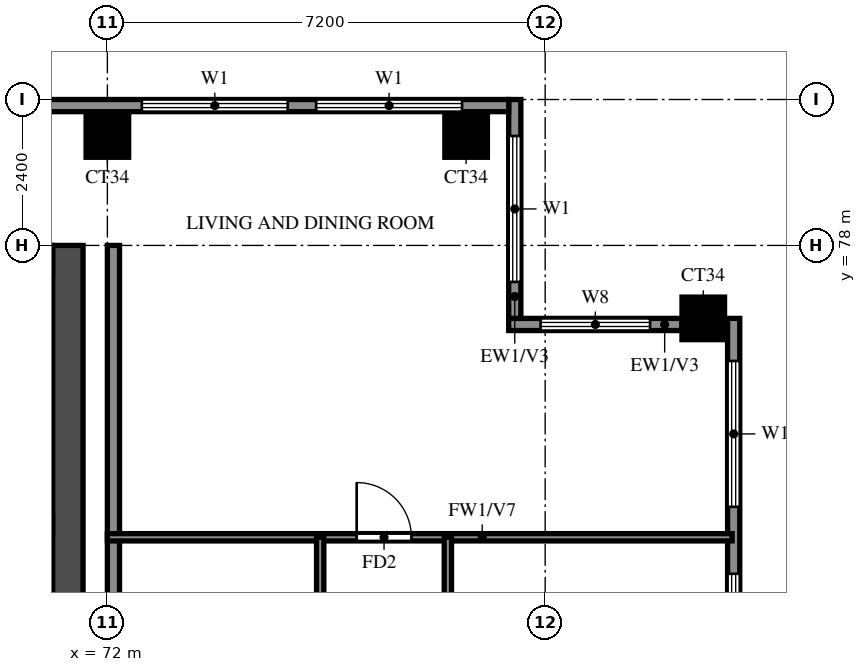
"""IFC4 building model, lengths in metres.
Left out: names, types, materials, properties, quantities, classifications, styles, units other than length and angle.
Written with IfcOpenShell. Run it as: python <this file> out.ifc"""

import sys

from ifc_helpers import new_model, si_unit, direction, frame, frame_2d, origin, origin_2d, place, context, subcontext, project, spatial, rectangle, extrude, source, transform, mapped, element, fill, save


model = new_model("IFC4")
c1 = context("Model", 3, precision=1e-05, world=origin(), true_north=direction((0.0, 1.0)))
c2 = subcontext(c1, "Body", "Model", "MODEL_VIEW")
j1 = project(units=[si_unit("LENGTHUNIT", "METRE"), si_unit("PLANEANGLEUNIT", "RADIAN")], contexts=[c1])
p1 = place(None, origin())
s1 = spatial("IfcSite", under=j1, at=p1, CompositionType="ELEMENT")
p2 = place(p1, origin())
s2 = spatial("IfcBuilding", under=s1, at=p2, CompositionType="ELEMENT")
p3 = place(p2, frame((0.0, 0.0, 225.5)))
s3 = spatial("IfcBuildingStorey", under=s2, at=p3, CompositionType="ELEMENT", Elevation=225.5)
m1 = source(origin(), c2, "Body", "SweptSolid", [
    extrude(rectangle(XDim=0.7, YDim=0.7, at=origin_2d()), origin(), (0.0, 0.0, 1.0), 3.22),
])
for number, where, z_axis, x_axis in (
    (1, (81.8, 76.8, 0.0), (0.0, 0.0, 1.0), (1.0, 0.0, 0.0)),
    (2, (72.0, 79.8, 0.0), (0.0, 0.0, 1.0), (1.0, 0.0, 0.0)),
    (3, (77.9, 79.8, 0.0), (0.0, 0.0, 1.0), (1.0, 0.0, 0.0)),
):
    element("IfcColumn", number, at=place(p3, frame(where, z_axis=z_axis, x_axis=x_axis)), inside=s3, PredefinedType="COLUMN", context=c2, shape_type="MappedRepresentation", body=[
        mapped(m1, transform((0.0, 0.0, 0.0))),
    ])
p4 = place(p3, frame((71.35, 66.15, 0.0), z_axis=(0.0, 0.0, 1.0), x_axis=(0.0, 1.0, 0.0)))
e4 = element("IfcWall", 4, at=p4, inside=s3, PredefinedType="SHEAR", context=c2, shape_type="SweptSolid", body=[
    extrude(rectangle(XDim=11.85, YDim=0.5, at=frame_2d((5.925, 0.0))), origin(), (0.0, 0.0, 1.0), 3.22),
])
p5 = place(p3, frame((29.7, 77.75, 0.0), z_axis=(0.0, 0.0, 1.0), x_axis=(1.0, 0.0, 0.0)))
e5 = element("IfcWall", 5, at=p5, inside=s3, PredefinedType="SHEAR", context=c2, shape_type="SweptSolid", body=[
    extrude(rectangle(XDim=41.4, YDim=0.5, at=frame_2d((20.7, 0.0))), origin(), (0.0, 0.0, 1.0), 3.22),
])
p6 = place(p3, frame((82.3, 48.2, 0.0), z_axis=(0.0, 0.0, 1.0), x_axis=(0.0, 1.0, 0.0)))
e6 = element("IfcWall", 6, at=p6, inside=s3, PredefinedType="SOLIDWALL", context=c2, shape_type="SweptSolid", body=[
    extrude(rectangle(XDim=28.6, YDim=0.2, at=frame_2d((14.3, 0.0))), origin(), (0.0, 0.0, 1.0), 3.22),
])
p7 = place(p6, frame((15.1, 0.0, 0.0)))
e7 = element("IfcOpeningElement", 7, at=p7, cuts=e6, PredefinedType="OPENING", context=c2, shape_type="SweptSolid", body=[
    extrude(rectangle(XDim=1.8, YDim=2.4, at=frame_2d((0.9, 1.2))), frame((0.0, 0.11, 0.0), z_axis=(0.0, -1.0, 0.0), x_axis=(1.0, 0.0, 0.0)), (0.0, 0.0, 1.0), 0.22),
])
p8 = place(p6, frame((0.6, 0.0, 0.6)))
e8 = element("IfcOpeningElement", 8, at=p8, cuts=e6, PredefinedType="OPENING", context=c2, shape_type="SweptSolid", body=[
    extrude(rectangle(XDim=2.4, YDim=2.4, at=frame_2d((1.2, 1.2))), frame((0.0, 0.11, 0.0), z_axis=(0.0, -1.0, 0.0), x_axis=(1.0, 0.0, 0.0)), (0.0, 0.0, 1.0), 0.22),
])
p9 = place(p6, frame((4.75, 0.0, 1.5)))
e9 = element("IfcOpeningElement", 9, at=p9, cuts=e6, PredefinedType="OPENING", context=c2, shape_type="SweptSolid", body=[
    extrude(rectangle(XDim=0.9, YDim=0.9, at=frame_2d((0.45, 0.45))), frame((0.0, 0.11, 0.0), z_axis=(0.0, -1.0, 0.0), x_axis=(1.0, 0.0, 0.0)), (0.0, 0.0, 1.0), 0.22),
])
p10 = place(p6, frame((8.2, 0.0, 0.6)))
e10 = element("IfcOpeningElement", 10, at=p10, cuts=e6, PredefinedType="OPENING", context=c2, shape_type="SweptSolid", body=[
    extrude(rectangle(XDim=2.4, YDim=2.4, at=frame_2d((1.2, 1.2))), frame((0.0, 0.11, 0.0), z_axis=(0.0, -1.0, 0.0), x_axis=(1.0, 0.0, 0.0)), (0.0, 0.0, 1.0), 0.22),
])
p11 = place(p6, frame((12.7, 0.0, 0.6)))
e11 = element("IfcOpeningElement", 11, at=p11, cuts=e6, PredefinedType="OPENING", context=c2, shape_type="SweptSolid", body=[
    extrude(rectangle(XDim=1.2, YDim=2.4, at=frame_2d((0.6, 1.2))), frame((0.0, 0.11, 0.0), z_axis=(0.0, -1.0, 0.0), x_axis=(1.0, 0.0, 0.0)), (0.0, 0.0, 1.0), 0.22),
])
p12 = place(p6, frame((19.3, 0.0, 0.6)))
e12 = element("IfcOpeningElement", 12, at=p12, cuts=e6, PredefinedType="OPENING", context=c2, shape_type="SweptSolid", body=[
    extrude(rectangle(XDim=1.8, YDim=2.4, at=frame_2d((0.9, 1.2))), frame((0.0, 0.11, 0.0), z_axis=(0.0, -1.0, 0.0), x_axis=(1.0, 0.0, 0.0)), (0.0, 0.0, 1.0), 0.22),
])
p13 = place(p6, frame((22.0, 0.0, 0.6)))
e13 = element("IfcOpeningElement", 13, at=p13, cuts=e6, PredefinedType="OPENING", context=c2, shape_type="SweptSolid", body=[
    extrude(rectangle(XDim=2.4, YDim=2.4, at=frame_2d((1.2, 1.2))), frame((0.0, 0.11, 0.0), z_axis=(0.0, -1.0, 0.0), x_axis=(1.0, 0.0, 0.0)), (0.0, 0.0, 1.0), 0.22),
])
p14 = place(p6, frame((25.5, 0.0, 0.6)))
e14 = element("IfcOpeningElement", 14, at=p14, cuts=e6, PredefinedType="OPENING", context=c2, shape_type="SweptSolid", body=[
    extrude(rectangle(XDim=2.4, YDim=2.4, at=frame_2d((1.2, 1.2))), frame((0.0, 0.11, 0.0), z_axis=(0.0, -1.0, 0.0), x_axis=(1.0, 0.0, 0.0)), (0.0, 0.0, 1.0), 0.22),
])
p15 = place(p3, frame((81.45, 76.7, 0.0), z_axis=(0.0, 0.0, 1.0), x_axis=(-1.0, 0.0, 0.0)))
e15 = element("IfcWall", 15, at=p15, inside=s3, PredefinedType="SOLIDWALL", context=c2, shape_type="SweptSolid", body=[
    extrude(rectangle(XDim=2.85, YDim=0.2, at=frame_2d((1.425, 0.0))), origin(), (0.0, 0.0, 1.0), 3.22),
])
p16 = place(p15, frame((0.525, 0.0, 0.6)))
e16 = element("IfcOpeningElement", 16, at=p16, cuts=e15, PredefinedType="OPENING", context=c2, shape_type="SweptSolid", body=[
    extrude(rectangle(XDim=1.8, YDim=2.4, at=frame_2d((0.9, 1.2))), frame((0.0, 0.11, 0.0), z_axis=(0.0, -1.0, 0.0), x_axis=(1.0, 0.0, 0.0)), (0.0, 0.0, 1.0), 0.22),
])
p17 = place(p3, frame((78.7, 76.8, 0.0), z_axis=(0.0, 0.0, 1.0), x_axis=(0.0, 1.0, 0.0)))
e17 = element("IfcWall", 17, at=p17, inside=s3, PredefinedType="SOLIDWALL", context=c2, shape_type="SweptSolid", body=[
    extrude(rectangle(XDim=3.6, YDim=0.2, at=frame_2d((1.8, 0.0))), origin(), (0.0, 0.0, 1.0), 3.22),
])
p18 = place(p17, frame((0.6, 0.0, 0.6)))
e18 = element("IfcOpeningElement", 18, at=p18, cuts=e17, PredefinedType="OPENING", context=c2, shape_type="SweptSolid", body=[
    extrude(rectangle(XDim=2.4, YDim=2.4, at=frame_2d((1.2, 1.2))), frame((0.0, 0.11, 0.0), z_axis=(0.0, -1.0, 0.0), x_axis=(1.0, 0.0, 0.0)), (0.0, 0.0, 1.0), 0.22),
])
p19 = place(p3, frame((78.6, 80.3, 0.0), z_axis=(0.0, 0.0, 1.0), x_axis=(-1.0, 0.0, 0.0)))
e19 = element("IfcWall", 19, at=p19, inside=s3, PredefinedType="SOLIDWALL", context=c2, shape_type="SweptSolid", body=[
    extrude(rectangle(XDim=56.6, YDim=0.2, at=frame_2d((28.3, 0.0))), origin(), (0.0, 0.0, 1.0), 3.22),
])
p20 = place(p19, frame((50.433, 0.0, 0.6)))
e20 = element("IfcOpeningElement", 20, at=p20, cuts=e19, PredefinedType="OPENING", context=c2, shape_type="SweptSolid", body=[
    extrude(rectangle(XDim=2.4, YDim=2.4, at=frame_2d((1.2, 1.2))), frame((0.0, 0.11, 0.0), z_axis=(0.0, -1.0, 0.0), x_axis=(1.0, 0.0, 0.0)), (0.0, 0.0, 1.0), 0.22),
])
p21 = place(p19, frame((53.367, 0.0, 0.6)))
e21 = element("IfcOpeningElement", 21, at=p21, cuts=e19, PredefinedType="OPENING", context=c2, shape_type="SweptSolid", body=[
    extrude(rectangle(XDim=2.4, YDim=2.4, at=frame_2d((1.2, 1.2))), frame((0.0, 0.11, 0.0), z_axis=(0.0, -1.0, 0.0), x_axis=(1.0, 0.0, 0.0)), (0.0, 0.0, 1.0), 0.22),
])
p22 = place(p19, frame((0.767, 0.0, 0.6)))
e22 = element("IfcOpeningElement", 22, at=p22, cuts=e19, PredefinedType="OPENING", context=c2, shape_type="SweptSolid", body=[
    extrude(rectangle(XDim=2.4, YDim=2.4, at=frame_2d((1.2, 1.2))), frame((0.0, 0.11, 0.0), z_axis=(0.0, -1.0, 0.0), x_axis=(1.0, 0.0, 0.0)), (0.0, 0.0, 1.0), 0.22),
])
p23 = place(p19, frame((3.633, 0.0, 0.6)))
e23 = element("IfcOpeningElement", 23, at=p23, cuts=e19, PredefinedType="OPENING", context=c2, shape_type="SweptSolid", body=[
    extrude(rectangle(XDim=2.4, YDim=2.4, at=frame_2d((1.2, 1.2))), frame((0.0, 0.11, 0.0), z_axis=(0.0, -1.0, 0.0), x_axis=(1.0, 0.0, 0.0)), (0.0, 0.0, 1.0), 0.22),
])
p24 = place(p3, frame((72.1, 62.4, 0.0), z_axis=(0.0, 0.0, 1.0), x_axis=(0.0, 1.0, 0.0)))
e24 = element("IfcWall", 24, at=p24, inside=s3, PredefinedType="SOLIDWALL", context=c2, shape_type="SweptSolid", body=[
    extrude(rectangle(XDim=15.6, YDim=0.2, at=frame_2d((7.8, 0.0))), origin(), (0.0, 0.0, 1.0), 3.22),
])
p25 = place(p3, frame((72.0, 73.2, 0.0), z_axis=(0.0, 0.0, 1.0), x_axis=(1.0, 0.0, 0.0)))
e25 = element("IfcWall", 25, at=p25, inside=s3, PredefinedType="PARTITIONING", context=c2, shape_type="SweptSolid", body=[
    extrude(rectangle(XDim=10.275, YDim=0.12, at=frame_2d((5.137, 0.0))), origin(), (0.0, 0.0, 1.0), 2.32),
])
p26 = place(p25, frame((4.1, 0.0, 0.0)))
e26 = element("IfcOpeningElement", 26, at=p26, cuts=e25, PredefinedType="OPENING", context=c2, shape_type="SweptSolid", body=[
    extrude(rectangle(XDim=0.9, YDim=2.1, at=frame_2d((0.45, 1.05))), frame((0.0, 0.07, 0.0), z_axis=(0.0, -1.0, 0.0), x_axis=(1.0, 0.0, 0.0)), (0.0, 0.0, 1.0), 0.14),
])
p27 = place(p3, frame((75.5, 64.8, 0.0), z_axis=(0.0, 0.0, 1.0), x_axis=(0.0, 1.0, 0.0)))
e27 = element("IfcWall", 27, at=p27, inside=s3, PredefinedType="PARTITIONING", context=c2, shape_type="SweptSolid", body=[
    extrude(rectangle(XDim=8.4, YDim=0.12, at=frame_2d((4.2, 0.0))), origin(), (0.0, 0.0, 1.0), 3.22),
])
p28 = place(p27, frame((1.925, 0.0, 0.0)))
e28 = element("IfcOpeningElement", 28, at=p28, cuts=e27, PredefinedType="OPENING", context=c2, shape_type="SweptSolid", body=[
    extrude(rectangle(XDim=0.9, YDim=2.1, at=frame_2d((0.45, 1.05))), frame((0.0, 0.07, 0.0), z_axis=(0.0, -1.0, 0.0), x_axis=(1.0, 0.0, 0.0)), (0.0, 0.0, 1.0), 0.14),
])
p29 = place(p27, frame((6.175, 0.0, 0.0)))
e29 = element("IfcOpeningElement", 29, at=p29, cuts=e27, PredefinedType="OPENING", context=c2, shape_type="SweptSolid", body=[
    extrude(rectangle(XDim=0.8, YDim=2.1, at=frame_2d((0.4, 1.05))), frame((0.0, 0.07, 0.0), z_axis=(0.0, -1.0, 0.0), x_axis=(1.0, 0.0, 0.0)), (0.0, 0.0, 1.0), 0.14),
])
p30 = place(p3, frame((77.6, 55.2, 0.0), z_axis=(0.0, 0.0, 1.0), x_axis=(0.0, 1.0, 0.0)))
e30 = element("IfcWall", 30, at=p30, inside=s3, PredefinedType="PARTITIONING", context=c2, shape_type="SweptSolid", body=[
    extrude(rectangle(XDim=18.0, YDim=0.12, at=frame_2d((9.0, 0.0))), origin(), (0.0, 0.0, 1.0), 3.22),
])
p31 = place(p30, frame((2.85, 0.0, 0.0)))
e31 = element("IfcOpeningElement", 31, at=p31, cuts=e30, PredefinedType="OPENING", context=c2, shape_type="SweptSolid", body=[
    extrude(rectangle(XDim=1.5, YDim=2.1, at=frame_2d((0.75, 1.05))), frame((0.0, 0.07, 0.0), z_axis=(0.0, -1.0, 0.0), x_axis=(1.0, 0.0, 0.0)), (0.0, 0.0, 1.0), 0.14),
])
p32 = place(p30, frame((8.55, 0.0, 0.0)))
e32 = element("IfcOpeningElement", 32, at=p32, cuts=e30, PredefinedType="OPENING", context=c2, shape_type="SweptSolid", body=[
    extrude(rectangle(XDim=0.9, YDim=2.1, at=frame_2d((0.45, 1.05))), frame((0.0, 0.07, 0.0), z_axis=(0.0, -1.0, 0.0), x_axis=(1.0, 0.0, 0.0)), (0.0, 0.0, 1.0), 0.14),
])
p33 = place(p30, frame((12.15, 0.0, 0.0)))
e33 = element("IfcOpeningElement", 33, at=p33, cuts=e30, PredefinedType="OPENING", context=c2, shape_type="SweptSolid", body=[
    extrude(rectangle(XDim=0.9, YDim=2.1, at=frame_2d((0.45, 1.05))), frame((0.0, 0.07, 0.0), z_axis=(0.0, -1.0, 0.0), x_axis=(1.0, 0.0, 0.0)), (0.0, 0.0, 1.0), 0.14),
])
p34 = place(p30, frame((15.75, 0.0, 0.0)))
e34 = element("IfcOpeningElement", 34, at=p34, cuts=e30, PredefinedType="OPENING", context=c2, shape_type="SweptSolid", body=[
    extrude(rectangle(XDim=0.9, YDim=2.1, at=frame_2d((0.45, 1.05))), frame((0.0, 0.07, 0.0), z_axis=(0.0, -1.0, 0.0), x_axis=(1.0, 0.0, 0.0)), (0.0, 0.0, 1.0), 0.14),
])
p35 = place(p13, origin())
e35 = element("IfcWindow", 35, at=p35, inside=s3, PartitioningType="DOUBLE_PANEL_VERTICAL", PredefinedType="WINDOW", context=c2, shape_type="SweptSolid", body=[
    extrude(rectangle(XDim=2.4, YDim=2.4, at=frame_2d((1.2, 1.2))), frame((0.0, 0.03, 0.0), z_axis=(0.0, -1.0, 0.0), x_axis=(1.0, 0.0, 0.0)), (0.0, 0.0, 1.0), 0.06),
])
fill(e13, e35)
p36 = place(p14, origin())
e36 = element("IfcWindow", 36, at=p36, inside=s3, PartitioningType="DOUBLE_PANEL_VERTICAL", PredefinedType="WINDOW", context=c2, shape_type="SweptSolid", body=[
    extrude(rectangle(XDim=2.4, YDim=2.4, at=frame_2d((1.2, 1.2))), frame((0.0, 0.03, 0.0), z_axis=(0.0, -1.0, 0.0), x_axis=(1.0, 0.0, 0.0)), (0.0, 0.0, 1.0), 0.06),
])
fill(e14, e36)
p37 = place(p16, origin())
e37 = element("IfcWindow", 37, at=p37, inside=s3, PartitioningType="DOUBLE_PANEL_VERTICAL", PredefinedType="WINDOW", context=c2, shape_type="SweptSolid", body=[
    extrude(rectangle(XDim=1.8, YDim=2.4, at=frame_2d((0.9, 1.2))), frame((0.0, 0.03, 0.0), z_axis=(0.0, -1.0, 0.0), x_axis=(1.0, 0.0, 0.0)), (0.0, 0.0, 1.0), 0.06),
])
fill(e16, e37)
p38 = place(p18, origin())
e38 = element("IfcWindow", 38, at=p38, inside=s3, PartitioningType="DOUBLE_PANEL_VERTICAL", PredefinedType="WINDOW", context=c2, shape_type="SweptSolid", body=[
    extrude(rectangle(XDim=2.4, YDim=2.4, at=frame_2d((1.2, 1.2))), frame((0.0, 0.03, 0.0), z_axis=(0.0, -1.0, 0.0), x_axis=(1.0, 0.0, 0.0)), (0.0, 0.0, 1.0), 0.06),
])
fill(e18, e38)
p39 = place(p22, origin())
e39 = element("IfcWindow", 39, at=p39, inside=s3, PartitioningType="DOUBLE_PANEL_VERTICAL", PredefinedType="WINDOW", context=c2, shape_type="SweptSolid", body=[
    extrude(rectangle(XDim=2.4, YDim=2.4, at=frame_2d((1.2, 1.2))), frame((0.0, 0.03, 0.0), z_axis=(0.0, -1.0, 0.0), x_axis=(1.0, 0.0, 0.0)), (0.0, 0.0, 1.0), 0.06),
])
fill(e22, e39)
p40 = place(p23, origin())
e40 = element("IfcWindow", 40, at=p40, inside=s3, PartitioningType="DOUBLE_PANEL_VERTICAL", PredefinedType="WINDOW", context=c2, shape_type="SweptSolid", body=[
    extrude(rectangle(XDim=2.4, YDim=2.4, at=frame_2d((1.2, 1.2))), frame((0.0, 0.03, 0.0), z_axis=(0.0, -1.0, 0.0), x_axis=(1.0, 0.0, 0.0)), (0.0, 0.0, 1.0), 0.06),
])
fill(e23, e40)
p41 = place(p26, origin())
e41 = element("IfcDoor", 41, at=p41, inside=s3, OperationType="SINGLE_SWING_RIGHT", PredefinedType="DOOR", context=c2, shape_type="SweptSolid", body=[
    extrude(rectangle(XDim=0.9, YDim=2.1, at=frame_2d((0.45, 1.05))), frame((0.0, 0.025, 0.0), z_axis=(0.0, -1.0, 0.0), x_axis=(1.0, 0.0, 0.0)), (0.0, 0.0, 1.0), 0.05),
])
fill(e26, e41)
save(model, sys.argv[1])
